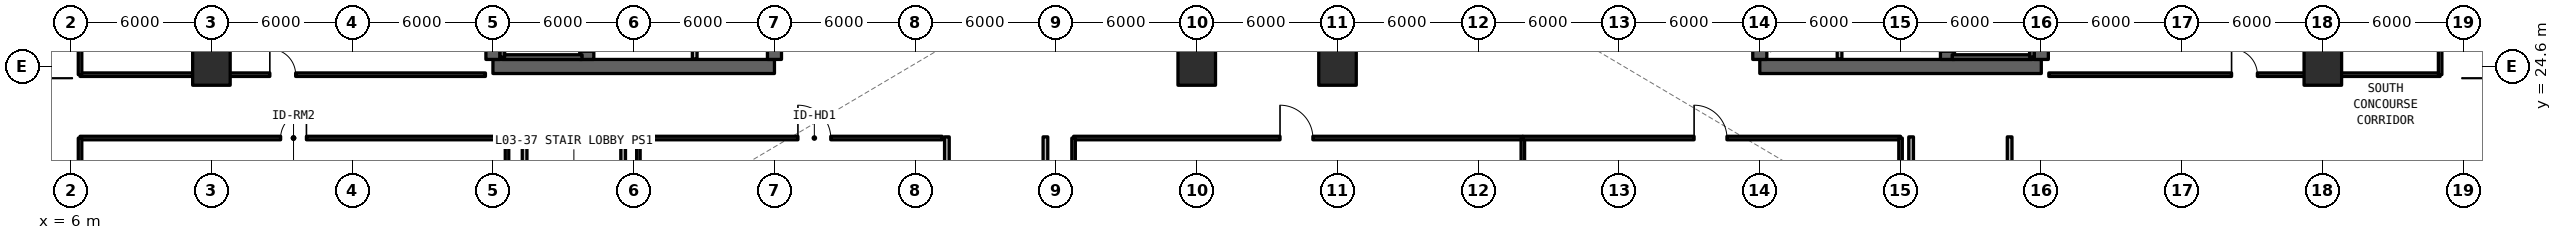
"""IFC4 building model, lengths in metres.
Left out: names, types, materials, properties, quantities, classifications, styles, units other than length and angle.
Written with IfcOpenShell. Run it as: python <this file> out.ifc"""

import sys

from ifc_helpers import new_model, si_unit, direction, frame, frame_2d, origin, origin_2d, place, context, subcontext, project, spatial, rectangle, extrude, element, fill, save


model = new_model("IFC4")
c1 = context("Model", 3, precision=1e-05, world=origin(), true_north=direction((0.0, 1.0)))
c2 = subcontext(c1, "Body", "Model", "MODEL_VIEW")
j1 = project(units=[si_unit("LENGTHUNIT", "METRE"), si_unit("PLANEANGLEUNIT", "RADIAN")], contexts=[c1])
p1 = place(None, origin())
s1 = spatial("IfcSite", under=j1, at=p1, CompositionType="ELEMENT")
p2 = place(p1, origin())
s2 = spatial("IfcBuilding", under=s1, at=p2, CompositionType="ELEMENT")
p3 = place(p2, frame((0.0, 0.0, 9.9)))
s3 = spatial("IfcBuildingStorey", under=s2, at=p3, CompositionType="ELEMENT", Elevation=9.9)
p4 = place(p3, frame((24.0, 24.6, 0.0), z_axis=(0.0, 0.0, 1.0), x_axis=(1.0, 0.0, 0.0)))
e1 = element("IfcWall", 1, at=p4, inside=s3, PredefinedType="SHEAR", context=c2, shape_type="SweptSolid", body=[
    extrude(rectangle(XDim=12.0, YDim=0.6, at=frame_2d((6.0, 0.0))), origin(), (0.0, 0.0, 1.0), 4.95),
])
p5 = place(p3, frame((24.0, 24.9, 0.0), z_axis=(0.0, 0.0, 1.0), x_axis=(0.0, 1.0, 0.0)))
e2 = element("IfcWall", 2, at=p5, inside=s3, PredefinedType="SHEAR", context=c2, shape_type="SweptSolid", body=[
    extrude(rectangle(XDim=17.4, YDim=0.6, at=frame_2d((8.7, 0.0))), origin(), (0.0, 0.0, 1.0), 4.95),
])
p6 = place(p3, frame((36.0, 24.9, 0.0), z_axis=(0.0, 0.0, 1.0), x_axis=(0.0, 1.0, 0.0)))
e3 = element("IfcWall", 3, at=p6, inside=s3, PredefinedType="SHEAR", context=c2, shape_type="SweptSolid", body=[
    extrude(rectangle(XDim=8.9, YDim=0.6, at=frame_2d((4.45, 0.0))), origin(), (0.0, 0.0, 1.0), 4.95),
])
p7 = place(p3, frame((28.0, 24.9, 0.0), z_axis=(0.0, 0.0, 1.0), x_axis=(0.0, 1.0, 0.0)))
e4 = element("IfcWall", 4, at=p7, inside=s3, PredefinedType="SHEAR", context=c2, shape_type="SweptSolid", body=[
    extrude(rectangle(XDim=17.4, YDim=0.6, at=frame_2d((8.7, 0.0))), origin(), (0.0, 0.0, 1.0), 4.95),
])
p8 = place(p7, frame((0.35, 0.0, 0.0)))
e5 = element("IfcOpeningElement", 5, at=p8, cuts=e4, PredefinedType="OPENING", context=c2, shape_type="SweptSolid", body=[
    extrude(rectangle(XDim=1.15, YDim=2.15, at=frame_2d((0.575, 1.075))), frame((0.0, 0.31, 0.0), z_axis=(0.0, -1.0, 0.0), x_axis=(1.0, 0.0, 0.0)), (0.0, 0.0, 1.0), 0.62),
])
p9 = place(p7, frame((9.55, 0.0, 0.0)))
e6 = element("IfcOpeningElement", 6, at=p9, cuts=e4, PredefinedType="OPENING", context=c2, shape_type="SweptSolid", body=[
    extrude(rectangle(XDim=1.15, YDim=2.15, at=frame_2d((0.575, 1.075))), frame((0.0, 0.31, 0.0), z_axis=(0.0, -1.0, 0.0), x_axis=(1.0, 0.0, 0.0)), (0.0, 0.0, 1.0), 0.62),
])
p10 = place(p3, frame((78.0, 24.6, 0.0), z_axis=(0.0, 0.0, 1.0), x_axis=(1.0, 0.0, 0.0)))
e7 = element("IfcWall", 7, at=p10, inside=s3, PredefinedType="SHEAR", context=c2, shape_type="SweptSolid", body=[
    extrude(rectangle(XDim=12.0, YDim=0.6, at=frame_2d((6.0, 0.0))), origin(), (0.0, 0.0, 1.0), 4.95),
])
p11 = place(p3, frame((90.0, 24.9, 0.0), z_axis=(0.0, 0.0, 1.0), x_axis=(0.0, 1.0, 0.0)))
e8 = element("IfcWall", 8, at=p11, inside=s3, PredefinedType="SHEAR", context=c2, shape_type="SweptSolid", body=[
    extrude(rectangle(XDim=17.4, YDim=0.6, at=frame_2d((8.7, 0.0))), origin(), (0.0, 0.0, 1.0), 4.95),
])
p12 = place(p3, frame((78.0, 24.9, 0.0), z_axis=(0.0, 0.0, 1.0), x_axis=(0.0, 1.0, 0.0)))
e9 = element("IfcWall", 9, at=p12, inside=s3, PredefinedType="SHEAR", context=c2, shape_type="SweptSolid", body=[
    extrude(rectangle(XDim=8.9, YDim=0.6, at=frame_2d((4.45, 0.0))), origin(), (0.0, 0.0, 1.0), 4.95),
])
p13 = place(p3, frame((86.0, 24.9, 0.0), z_axis=(0.0, 0.0, 1.0), x_axis=(0.0, 1.0, 0.0)))
e10 = element("IfcWall", 10, at=p13, inside=s3, PredefinedType="SHEAR", context=c2, shape_type="SweptSolid", body=[
    extrude(rectangle(XDim=17.4, YDim=0.6, at=frame_2d((8.7, 0.0))), origin(), (0.0, 0.0, 1.0), 4.95),
])
p14 = place(p13, frame((0.35, 0.0, 0.0)))
e11 = element("IfcOpeningElement", 11, at=p14, cuts=e10, PredefinedType="OPENING", context=c2, shape_type="SweptSolid", body=[
    extrude(rectangle(XDim=1.15, YDim=2.15, at=frame_2d((0.575, 1.075))), frame((0.0, 0.31, 0.0), z_axis=(0.0, -1.0, 0.0), x_axis=(1.0, 0.0, 0.0)), (0.0, 0.0, 1.0), 0.62),
])
p15 = place(p13, frame((9.55, 0.0, 0.0)))
e12 = element("IfcOpeningElement", 12, at=p15, cuts=e10, PredefinedType="OPENING", context=c2, shape_type="SweptSolid", body=[
    extrude(rectangle(XDim=1.15, YDim=2.15, at=frame_2d((0.575, 1.075))), frame((0.0, 0.31, 0.0), z_axis=(0.0, -1.0, 0.0), x_axis=(1.0, 0.0, 0.0)), (0.0, 0.0, 1.0), 0.62),
])
for number, where, z_axis, x_axis in (
    (13, (12.0, 24.6, 0.0), (0.0, 0.0, 1.0), (1.0, 0.0, 0.0)),
    (14, (54.0, 24.6, 0.0), (0.0, 0.0, 1.0), (1.0, 0.0, 0.0)),
    (15, (60.0, 24.6, 0.0), (0.0, 0.0, 1.0), (1.0, 0.0, 0.0)),
    (16, (102.0, 24.6, 0.0), (0.0, 0.0, 1.0), (1.0, 0.0, 0.0)),
):
    element("IfcColumn", number, at=place(p3, frame(where, z_axis=z_axis, x_axis=x_axis)), inside=s3, PredefinedType="COLUMN", context=c2, shape_type="SweptSolid", body=[
        extrude(rectangle(XDim=1.6, YDim=1.6, at=origin_2d()), origin(), (0.0, 0.0, 1.0), 4.95),
    ])
p16 = place(p3, frame((32.6, 24.92, 0.0), z_axis=(0.0, 0.0, 1.0), x_axis=(0.0, 1.0, 0.0)))
e17 = element("IfcWall", 17, at=p16, inside=s3, PredefinedType="SOLIDWALL", context=c2, shape_type="SweptSolid", body=[
    extrude(rectangle(XDim=3.58, YDim=0.2, at=frame_2d((1.79, 0.0))), origin(), (0.0, 0.0, 1.0), 3.89),
])
p17 = place(p16, frame((1.3, 0.0, 0.0)))
e18 = element("IfcOpeningElement", 18, at=p17, cuts=e17, PredefinedType="OPENING", context=c2, shape_type="SweptSolid", body=[
    extrude(rectangle(XDim=1.1, YDim=2.2, at=frame_2d((0.55, 1.1))), frame((0.0, 0.11, 0.0), z_axis=(0.0, -1.0, 0.0), x_axis=(1.0, 0.0, 0.0)), (0.0, 0.0, 1.0), 0.22),
])
p18 = place(p3, frame((81.4, 24.92, 0.0), z_axis=(0.0, 0.0, 1.0), x_axis=(0.0, 1.0, 0.0)))
e19 = element("IfcWall", 19, at=p18, inside=s3, PredefinedType="SOLIDWALL", context=c2, shape_type="SweptSolid", body=[
    extrude(rectangle(XDim=3.58, YDim=0.2, at=frame_2d((1.79, 0.0))), origin(), (0.0, 0.0, 1.0), 3.89),
])
p19 = place(p18, frame((1.3, 0.0, 0.0)))
e20 = element("IfcOpeningElement", 20, at=p19, cuts=e19, PredefinedType="OPENING", context=c2, shape_type="SweptSolid", body=[
    extrude(rectangle(XDim=1.1, YDim=2.2, at=frame_2d((0.55, 1.1))), frame((0.0, 0.11, 0.0), z_axis=(0.0, -1.0, 0.0), x_axis=(1.0, 0.0, 0.0)), (0.0, 0.0, 1.0), 0.22),
])
for number, where, z_axis, x_axis in (
    (21, (25.35, 17.0, 0.0), (0.0, 0.0, 1.0), (0.0, 1.0, 0.0)),
    (22, (29.55, 17.0, 0.0), (0.0, 0.0, 1.0), (0.0, 1.0, 0.0)),
    (23, (43.35, 17.0, 0.0), (0.0, 0.0, 1.0), (0.0, 1.0, 0.0)),
    (24, (47.55, 17.0, 0.0), (0.0, 0.0, 1.0), (0.0, 1.0, 0.0)),
    (25, (84.45, 17.0, 0.0), (0.0, 0.0, 1.0), (0.0, 1.0, 0.0)),
    (26, (88.65, 17.0, 0.0), (0.0, 0.0, 1.0), (0.0, 1.0, 0.0)),
):
    element("IfcWall", number, at=place(p3, frame(where, z_axis=z_axis, x_axis=x_axis)), inside=s3, PredefinedType="SOLIDWALL", context=c2, shape_type="SweptSolid", body=[
        extrude(rectangle(XDim=4.6, YDim=0.2, at=frame_2d((2.3, 0.0))), origin(), (0.0, 0.0, 1.0), 3.89),
    ])
p20 = place(p3, frame((6.4, 21.55, 0.0), z_axis=(0.0, 0.0, 1.0), x_axis=(1.0, 0.0, 0.0)))
e27 = element("IfcWall", 27, at=p20, inside=s3, PredefinedType="SOLIDWALL", context=c2, shape_type="SweptSolid", body=[
    extrude(rectangle(XDim=18.2, YDim=0.15, at=frame_2d((9.1, 0.0))), origin(), (0.0, 0.0, 1.0), 3.89),
])
p21 = place(p20, frame((8.55, 0.0, 0.0)))
e28 = element("IfcOpeningElement", 28, at=p21, cuts=e27, PredefinedType="OPENING", context=c2, shape_type="SweptSolid", body=[
    extrude(rectangle(XDim=1.1, YDim=2.15, at=frame_2d((0.55, 1.075))), frame((0.0, 0.085, 0.0), z_axis=(0.0, -1.0, 0.0), x_axis=(1.0, 0.0, 0.0)), (0.0, 0.0, 1.0), 0.17),
])
for number, where, z_axis, x_axis in (
    (29, (6.4, 2.3, 0.0), (0.0, 0.0, 1.0), (0.0, 1.0, 0.0)),
    (30, (24.6, 2.3, 0.0), (0.0, 0.0, 1.0), (0.0, 1.0, 0.0)),
):
    element("IfcWall", number, at=place(p3, frame(where, z_axis=z_axis, x_axis=x_axis)), inside=s3, PredefinedType="SOLIDWALL", context=c2, shape_type="SweptSolid", body=[
        extrude(rectangle(XDim=19.25, YDim=0.15, at=frame_2d((9.625, 0.0))), origin(), (0.0, 0.0, 1.0), 3.89),
    ])
p22 = place(p3, frame((30.2, 21.55, 0.0), z_axis=(0.0, 0.0, 1.0), x_axis=(1.0, 0.0, 0.0)))
e31 = element("IfcWall", 31, at=p22, inside=s3, PredefinedType="SOLIDWALL", context=c2, shape_type="SweptSolid", body=[
    extrude(rectangle(XDim=12.95, YDim=0.15, at=frame_2d((6.475, 0.0))), origin(), (0.0, 0.0, 1.0), 3.89),
])
p23 = place(p22, frame((6.8, 0.0, 0.0)))
e32 = element("IfcOpeningElement", 32, at=p23, cuts=e31, PredefinedType="OPENING", context=c2, shape_type="SweptSolid", body=[
    extrude(rectangle(XDim=1.4, YDim=2.15, at=frame_2d((0.7, 1.075))), frame((0.0, 0.085, 0.0), z_axis=(0.0, -1.0, 0.0), x_axis=(1.0, 0.0, 0.0)), (0.0, 0.0, 1.0), 0.17),
])
p24 = place(p3, frame((30.2, 2.3, 0.0), z_axis=(0.0, 0.0, 1.0), x_axis=(0.0, 1.0, 0.0)))
e33 = element("IfcWall", 33, at=p24, inside=s3, PredefinedType="SOLIDWALL", context=c2, shape_type="SweptSolid", body=[
    extrude(rectangle(XDim=19.25, YDim=0.15, at=frame_2d((9.625, 0.0))), origin(), (0.0, 0.0, 1.0), 3.89),
])
p25 = place(p3, frame((48.75, 21.55, 0.0), z_axis=(0.0, 0.0, 1.0), x_axis=(1.0, 0.0, 0.0)))
e34 = element("IfcWall", 34, at=p25, inside=s3, PredefinedType="SOLIDWALL", context=c2, shape_type="SweptSolid", body=[
    extrude(rectangle(XDim=19.15, YDim=0.15, at=frame_2d((9.575, 0.0))), origin(), (0.0, 0.0, 1.0), 3.89),
])
p26 = place(p25, frame((8.8, 0.0, 0.0)))
e35 = element("IfcOpeningElement", 35, at=p26, cuts=e34, PredefinedType="OPENING", context=c2, shape_type="SweptSolid", body=[
    extrude(rectangle(XDim=1.4, YDim=2.15, at=frame_2d((0.7, 1.075))), frame((0.0, 0.085, 0.0), z_axis=(0.0, -1.0, 0.0), x_axis=(1.0, 0.0, 0.0)), (0.0, 0.0, 1.0), 0.17),
])
for number, where, z_axis, x_axis in (
    (36, (48.75, 2.3, 0.0), (0.0, 0.0, 1.0), (0.0, 1.0, 0.0)),
    (37, (67.9, 2.3, 0.0), (0.0, 0.0, 1.0), (0.0, 1.0, 0.0)),
):
    element("IfcWall", number, at=place(p3, frame(where, z_axis=z_axis, x_axis=x_axis)), inside=s3, PredefinedType="SOLIDWALL", context=c2, shape_type="SweptSolid", body=[
        extrude(rectangle(XDim=19.25, YDim=0.15, at=frame_2d((9.625, 0.0))), origin(), (0.0, 0.0, 1.0), 3.89),
    ])
p27 = place(p3, frame((67.9, 21.55, 0.0), z_axis=(0.0, 0.0, 1.0), x_axis=(1.0, 0.0, 0.0)))
e38 = element("IfcWall", 38, at=p27, inside=s3, PredefinedType="SOLIDWALL", context=c2, shape_type="SweptSolid", body=[
    extrude(rectangle(XDim=16.1, YDim=0.15, at=frame_2d((8.05, 0.0))), origin(), (0.0, 0.0, 1.0), 3.89),
])
p28 = place(p27, frame((7.3, 0.0, 0.0)))
e39 = element("IfcOpeningElement", 39, at=p28, cuts=e38, PredefinedType="OPENING", context=c2, shape_type="SweptSolid", body=[
    extrude(rectangle(XDim=1.4, YDim=2.15, at=frame_2d((0.7, 1.075))), frame((0.0, 0.085, 0.0), z_axis=(0.0, -1.0, 0.0), x_axis=(1.0, 0.0, 0.0)), (0.0, 0.0, 1.0), 0.17),
])
p29 = place(p3, frame((84.0, 2.3, 0.0), z_axis=(0.0, 0.0, 1.0), x_axis=(0.0, 1.0, 0.0)))
e40 = element("IfcWall", 40, at=p29, inside=s3, PredefinedType="SOLIDWALL", context=c2, shape_type="SweptSolid", body=[
    extrude(rectangle(XDim=19.25, YDim=0.15, at=frame_2d((9.625, 0.0))), origin(), (0.0, 0.0, 1.0), 3.89),
])
p30 = place(p3, frame((90.32, 24.25, 0.0), z_axis=(0.0, 0.0, 1.0), x_axis=(1.0, 0.0, 0.0)))
e41 = element("IfcWall", 41, at=p30, inside=s3, PredefinedType="SOLIDWALL", context=c2, shape_type="SweptSolid", body=[
    extrude(rectangle(XDim=16.68, YDim=0.15, at=frame_2d((8.34, 0.0))), origin(), (0.0, 0.0, 1.0), 3.89),
])
p31 = place(p30, frame((7.79, 0.0, 0.0)))
e42 = element("IfcOpeningElement", 42, at=p31, cuts=e41, PredefinedType="OPENING", context=c2, shape_type="SweptSolid", body=[
    extrude(rectangle(XDim=1.1, YDim=2.15, at=frame_2d((0.55, 1.075))), frame((0.0, 0.085, 0.0), z_axis=(0.0, -1.0, 0.0), x_axis=(1.0, 0.0, 0.0)), (0.0, 0.0, 1.0), 0.17),
])
p32 = place(p3, frame((107.0, 24.25, 0.0), z_axis=(0.0, 0.0, 1.0), x_axis=(0.0, 1.0, 0.0)))
e43 = element("IfcWall", 43, at=p32, inside=s3, PredefinedType="SOLIDWALL", context=c2, shape_type="SweptSolid", body=[
    extrude(rectangle(XDim=9.15, YDim=0.15, at=frame_2d((4.575, 0.0))), origin(), (0.0, 0.0, 1.0), 3.89),
])
p33 = place(p3, frame((6.4, 24.25, 0.0), z_axis=(0.0, 0.0, 1.0), x_axis=(1.0, 0.0, 0.0)))
e44 = element("IfcWall", 44, at=p33, inside=s3, PredefinedType="SOLIDWALL", context=c2, shape_type="SweptSolid", body=[
    extrude(rectangle(XDim=17.28, YDim=0.15, at=frame_2d((8.64, 0.0))), origin(), (0.0, 0.0, 1.0), 3.89),
])
p34 = place(p33, frame((8.09, 0.0, 0.0)))
e45 = element("IfcOpeningElement", 45, at=p34, cuts=e44, PredefinedType="OPENING", context=c2, shape_type="SweptSolid", body=[
    extrude(rectangle(XDim=1.1, YDim=2.15, at=frame_2d((0.55, 1.075))), frame((0.0, 0.085, 0.0), z_axis=(0.0, -1.0, 0.0), x_axis=(1.0, 0.0, 0.0)), (0.0, 0.0, 1.0), 0.17),
])
p35 = place(p3, frame((6.4, 24.25, 0.0), z_axis=(0.0, 0.0, 1.0), x_axis=(0.0, 1.0, 0.0)))
e46 = element("IfcWall", 46, at=p35, inside=s3, PredefinedType="SOLIDWALL", context=c2, shape_type="SweptSolid", body=[
    extrude(rectangle(XDim=18.7, YDim=0.15, at=frame_2d((9.35, 0.0))), origin(), (0.0, 0.0, 1.0), 3.89),
])
p36 = place(p3, frame((24.4, 25.0, 0.0), z_axis=(0.0, 0.0, 1.0), x_axis=(1.0, 0.0, 0.0)))
e47 = element("IfcWall", 47, at=p36, inside=s3, PredefinedType="SOLIDWALL", context=c2, shape_type="SweptSolid", body=[
    extrude(rectangle(XDim=3.4, YDim=0.2, at=frame_2d((1.7, 0.0))), origin(), (0.0, 0.0, 1.0), 4.95),
])
p37 = place(p3, frame((24.4, 33.0, 0.0), z_axis=(0.0, 0.0, 1.0), x_axis=(0.0, -1.0, 0.0)))
e48 = element("IfcWall", 48, at=p37, inside=s3, PredefinedType="SOLIDWALL", context=c2, shape_type="SweptSolid", body=[
    extrude(rectangle(XDim=8.0, YDim=0.2, at=frame_2d((4.0, 0.0))), origin(), (0.0, 0.0, 1.0), 4.95),
])
p38 = place(p3, frame((86.2, 25.0, 0.0), z_axis=(0.0, 0.0, 1.0), x_axis=(1.0, 0.0, 0.0)))
e49 = element("IfcWall", 49, at=p38, inside=s3, PredefinedType="SOLIDWALL", context=c2, shape_type="SweptSolid", body=[
    extrude(rectangle(XDim=3.4, YDim=0.2, at=frame_2d((1.7, 0.0))), origin(), (0.0, 0.0, 1.0), 4.95),
])
p39 = place(p3, frame((89.6, 25.0, 0.0), z_axis=(0.0, 0.0, 1.0), x_axis=(0.0, 1.0, 0.0)))
e50 = element("IfcWall", 50, at=p39, inside=s3, PredefinedType="SOLIDWALL", context=c2, shape_type="SweptSolid", body=[
    extrude(rectangle(XDim=8.0, YDim=0.2, at=frame_2d((4.0, 0.0))), origin(), (0.0, 0.0, 1.0), 4.95),
])
p40 = place(p21, origin())
e51 = element("IfcDoor", 51, at=p40, inside=s3, OperationType="SINGLE_SWING_RIGHT", PredefinedType="DOOR", context=c2, shape_type="SweptSolid", body=[
    extrude(rectangle(XDim=1.1, YDim=2.15, at=frame_2d((0.55, 1.075))), frame((0.0, 0.025, 0.0), z_axis=(0.0, -1.0, 0.0), x_axis=(1.0, 0.0, 0.0)), (0.0, 0.0, 1.0), 0.05),
])
fill(e28, e51)
p41 = place(p23, origin())
e52 = element("IfcDoor", 52, at=p41, inside=s3, OperationType="SINGLE_SWING_LEFT", PredefinedType="DOOR", context=c2, shape_type="SweptSolid", body=[
    extrude(rectangle(XDim=1.4, YDim=2.15, at=frame_2d((0.7, 1.075))), frame((0.0, 0.025, 0.0), z_axis=(0.0, -1.0, 0.0), x_axis=(1.0, 0.0, 0.0)), (0.0, 0.0, 1.0), 0.05),
])
fill(e32, e52)
p42 = place(p26, origin())
e53 = element("IfcDoor", 53, at=p42, inside=s3, OperationType="SINGLE_SWING_RIGHT", PredefinedType="DOOR", context=c2, shape_type="SweptSolid", body=[
    extrude(rectangle(XDim=1.4, YDim=2.15, at=frame_2d((0.7, 1.075))), frame((0.0, 0.025, 0.0), z_axis=(0.0, -1.0, 0.0), x_axis=(1.0, 0.0, 0.0)), (0.0, 0.0, 1.0), 0.05),
])
fill(e35, e53)
p43 = place(p28, origin())
e54 = element("IfcDoor", 54, at=p43, inside=s3, OperationType="SINGLE_SWING_LEFT", PredefinedType="DOOR", context=c2, shape_type="SweptSolid", body=[
    extrude(rectangle(XDim=1.4, YDim=2.15, at=frame_2d((0.7, 1.075))), frame((0.0, 0.025, 0.0), z_axis=(0.0, -1.0, 0.0), x_axis=(1.0, 0.0, 0.0)), (0.0, 0.0, 1.0), 0.05),
])
fill(e39, e54)
p44 = place(p31, origin())
e55 = element("IfcDoor", 55, at=p44, inside=s3, OperationType="SINGLE_SWING_LEFT", PredefinedType="DOOR", context=c2, shape_type="SweptSolid", body=[
    extrude(rectangle(XDim=1.1, YDim=2.15, at=frame_2d((0.55, 1.075))), frame((0.0, 0.025, 0.0), z_axis=(0.0, -1.0, 0.0), x_axis=(1.0, 0.0, 0.0)), (0.0, 0.0, 1.0), 0.05),
])
fill(e42, e55)
p45 = place(p34, origin())
e56 = element("IfcDoor", 56, at=p45, inside=s3, OperationType="SINGLE_SWING_LEFT", PredefinedType="DOOR", context=c2, shape_type="SweptSolid", body=[
    extrude(rectangle(XDim=1.1, YDim=2.15, at=frame_2d((0.55, 1.075))), frame((0.0, 0.025, 0.0), z_axis=(0.0, -1.0, 0.0), x_axis=(1.0, 0.0, 0.0)), (0.0, 0.0, 1.0), 0.05),
])
fill(e45, e56)
save(model, sys.argv[1])
